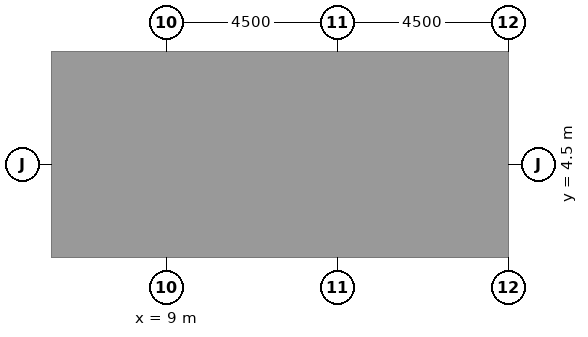
"""IFC4 building model, lengths in metres.
Left out: names, types, materials, properties, quantities, classifications, styles, units other than length and angle.
Written with IfcOpenShell. Run it as: python <this file> out.ifc"""

import sys

from ifc_helpers import new_model, si_unit, direction, frame, frame_2d, origin, place, context, subcontext, project, spatial, rectangle, extrude, element, fill, save


model = new_model("IFC4")
c1 = context("Model", 3, precision=1e-05, world=origin(), true_north=direction((0.0, 1.0)))
c2 = subcontext(c1, "Body", "Model", "MODEL_VIEW")
j1 = project(units=[si_unit("LENGTHUNIT", "METRE"), si_unit("PLANEANGLEUNIT", "RADIAN")], contexts=[c1])
p1 = place(None, origin())
s1 = spatial("IfcSite", under=j1, at=p1, CompositionType="ELEMENT")
p2 = place(p1, origin())
s2 = spatial("IfcBuilding", under=s1, at=p2, CompositionType="ELEMENT")
p3 = place(p2, frame((0.0, 0.0, 7.2)))
s3 = spatial("IfcBuildingStorey", under=s2, at=p3, CompositionType="ELEMENT", Elevation=7.2)
p4 = place(p3, frame((6.5, -9.0, 0.0), z_axis=(0.0, 0.0, 1.0), x_axis=(0.0, 1.0, 0.0)))
e1 = element("IfcWall", 1, at=p4, inside=s3, PredefinedType="SHEAR", context=c2, shape_type="SweptSolid", body=[
    extrude(rectangle(XDim=27.5, YDim=1.0, at=frame_2d((13.75, 0.0))), origin(), (0.0, 0.0, 1.0), 4.1),
])
p5 = place(p4, frame((12.55, 0.0, 0.0)))
e2 = element("IfcOpeningElement", 2, at=p5, cuts=e1, PredefinedType="OPENING", context=c2, shape_type="SweptSolid", body=[
    extrude(rectangle(XDim=2.4, YDim=2.4, at=frame_2d((1.2, 1.2))), frame((0.0, 0.51, 0.0), z_axis=(0.0, -1.0, 0.0), x_axis=(1.0, 0.0, 0.0)), (0.0, 0.0, 1.0), 1.02),
])
p6 = place(p4, frame((4.025, 0.0, 0.0)))
e3 = element("IfcOpeningElement", 3, at=p6, cuts=e1, PredefinedType="OPENING", context=c2, shape_type="SweptSolid", body=[
    extrude(rectangle(XDim=1.2, YDim=2.1, at=frame_2d((0.6, 1.05))), frame((0.0, 0.51, 0.0), z_axis=(0.0, -1.0, 0.0), x_axis=(1.0, 0.0, 0.0)), (0.0, 0.0, 1.0), 1.02),
])
p7 = place(p4, frame((22.275, 0.0, 0.0)))
e4 = element("IfcOpeningElement", 4, at=p7, cuts=e1, PredefinedType="OPENING", context=c2, shape_type="SweptSolid", body=[
    extrude(rectangle(XDim=1.2, YDim=2.1, at=frame_2d((0.6, 1.05))), frame((0.0, 0.51, 0.0), z_axis=(0.0, -1.0, 0.0), x_axis=(1.0, 0.0, 0.0)), (0.0, 0.0, 1.0), 1.02),
])
p8 = place(p3, frame((17.5, -9.0, 0.0), z_axis=(0.0, 0.0, 1.0), x_axis=(0.0, 1.0, 0.0)))
e5 = element("IfcWall", 5, at=p8, inside=s3, PredefinedType="SHEAR", context=c2, shape_type="SweptSolid", body=[
    extrude(rectangle(XDim=27.5, YDim=1.0, at=frame_2d((13.75, 0.0))), origin(), (0.0, 0.0, 1.0), 4.1),
])
p9 = place(p8, frame((12.55, 0.0, 0.0)))
e6 = element("IfcOpeningElement", 6, at=p9, cuts=e5, PredefinedType="OPENING", context=c2, shape_type="SweptSolid", body=[
    extrude(rectangle(XDim=2.4, YDim=2.4, at=frame_2d((1.2, 1.2))), frame((0.0, 0.51, 0.0), z_axis=(0.0, -1.0, 0.0), x_axis=(1.0, 0.0, 0.0)), (0.0, 0.0, 1.0), 1.02),
])
p10 = place(p8, frame((6.825, 0.0, 0.0)))
e7 = element("IfcOpeningElement", 7, at=p10, cuts=e5, PredefinedType="OPENING", context=c2, shape_type="SweptSolid", body=[
    extrude(rectangle(XDim=1.2, YDim=2.1, at=frame_2d((0.6, 1.05))), frame((0.0, 0.51, 0.0), z_axis=(0.0, -1.0, 0.0), x_axis=(1.0, 0.0, 0.0)), (0.0, 0.0, 1.0), 1.02),
])
p11 = place(p8, frame((19.475, 0.0, 0.0)))
e8 = element("IfcOpeningElement", 8, at=p11, cuts=e5, PredefinedType="OPENING", context=c2, shape_type="SweptSolid", body=[
    extrude(rectangle(XDim=1.2, YDim=2.1, at=frame_2d((0.6, 1.05))), frame((0.0, 0.51, 0.0), z_axis=(0.0, -1.0, 0.0), x_axis=(1.0, 0.0, 0.0)), (0.0, 0.0, 1.0), 1.02),
])
p12 = place(p3, frame((7.0, 2.8, 0.0), z_axis=(0.0, 0.0, 1.0), x_axis=(1.0, 0.0, 0.0)))
e9 = element("IfcWall", 9, at=p12, inside=s3, PredefinedType="SHEAR", context=c2, shape_type="SweptSolid", body=[
    extrude(rectangle(XDim=10.0, YDim=0.5, at=frame_2d((5.0, 0.0))), origin(), (0.0, 0.0, 1.0), 4.1),
])
p13 = place(p12, frame((0.512, 0.0, 0.0)))
e10 = element("IfcOpeningElement", 10, at=p13, cuts=e9, PredefinedType="OPENING", context=c2, shape_type="SweptSolid", body=[
    extrude(rectangle(XDim=1.1, YDim=2.1, at=frame_2d((0.55, 1.05))), frame((0.0, 0.26, 0.0), z_axis=(0.0, -1.0, 0.0), x_axis=(1.0, 0.0, 0.0)), (0.0, 0.0, 1.0), 0.52),
])
p14 = place(p12, frame((3.137, 0.0, 0.0)))
e11 = element("IfcOpeningElement", 11, at=p14, cuts=e9, PredefinedType="OPENING", context=c2, shape_type="SweptSolid", body=[
    extrude(rectangle(XDim=1.1, YDim=2.1, at=frame_2d((0.55, 1.05))), frame((0.0, 0.26, 0.0), z_axis=(0.0, -1.0, 0.0), x_axis=(1.0, 0.0, 0.0)), (0.0, 0.0, 1.0), 0.52),
])
p15 = place(p12, frame((8.387, 0.0, 0.0)))
e12 = element("IfcOpeningElement", 12, at=p15, cuts=e9, PredefinedType="OPENING", context=c2, shape_type="SweptSolid", body=[
    extrude(rectangle(XDim=1.1, YDim=2.1, at=frame_2d((0.55, 1.05))), frame((0.0, 0.26, 0.0), z_axis=(0.0, -1.0, 0.0), x_axis=(1.0, 0.0, 0.0)), (0.0, 0.0, 1.0), 0.52),
])
p16 = place(p3, frame((7.0, 6.7, 0.0), z_axis=(0.0, 0.0, 1.0), x_axis=(1.0, 0.0, 0.0)))
e13 = element("IfcWall", 13, at=p16, inside=s3, PredefinedType="SHEAR", context=c2, shape_type="SweptSolid", body=[
    extrude(rectangle(XDim=10.0, YDim=0.5, at=frame_2d((5.0, 0.0))), origin(), (0.0, 0.0, 1.0), 4.1),
])
p17 = place(p16, frame((0.512, 0.0, 0.0)))
e14 = element("IfcOpeningElement", 14, at=p17, cuts=e13, PredefinedType="OPENING", context=c2, shape_type="SweptSolid", body=[
    extrude(rectangle(XDim=1.1, YDim=2.1, at=frame_2d((0.55, 1.05))), frame((0.0, 0.26, 0.0), z_axis=(0.0, -1.0, 0.0), x_axis=(1.0, 0.0, 0.0)), (0.0, 0.0, 1.0), 0.52),
])
p18 = place(p16, frame((3.188, 0.0, 0.0)))
e15 = element("IfcOpeningElement", 15, at=p18, cuts=e13, PredefinedType="OPENING", context=c2, shape_type="SweptSolid", body=[
    extrude(rectangle(XDim=1.0, YDim=2.1, at=frame_2d((0.5, 1.05))), frame((0.0, 0.26, 0.0), z_axis=(0.0, -1.0, 0.0), x_axis=(1.0, 0.0, 0.0)), (0.0, 0.0, 1.0), 0.52),
])
p19 = place(p16, frame((5.812, 0.0, 0.0)))
e16 = element("IfcOpeningElement", 16, at=p19, cuts=e13, PredefinedType="OPENING", context=c2, shape_type="SweptSolid", body=[
    extrude(rectangle(XDim=1.0, YDim=2.1, at=frame_2d((0.5, 1.05))), frame((0.0, 0.26, 0.0), z_axis=(0.0, -1.0, 0.0), x_axis=(1.0, 0.0, 0.0)), (0.0, 0.0, 1.0), 0.52),
])
p20 = place(p16, frame((8.438, 0.0, 0.0)))
e17 = element("IfcOpeningElement", 17, at=p20, cuts=e13, PredefinedType="OPENING", context=c2, shape_type="SweptSolid", body=[
    extrude(rectangle(XDim=1.0, YDim=2.1, at=frame_2d((0.5, 1.05))), frame((0.0, 0.26, 0.0), z_axis=(0.0, -1.0, 0.0), x_axis=(1.0, 0.0, 0.0)), (0.0, 0.0, 1.0), 0.52),
])
for number, where, z_axis, x_axis in (
    (18, (9.375, -0.25, 0.0), (0.0, 0.0, 1.0), (0.0, 1.0, 0.0)),
    (19, (9.375, 6.95, 0.0), (0.0, 0.0, 1.0), (0.0, 1.0, 0.0)),
    (20, (12.0, -0.25, 0.0), (0.0, 0.0, 1.0), (0.0, 1.0, 0.0)),
    (21, (12.0, 6.95, 0.0), (0.0, 0.0, 1.0), (0.0, 1.0, 0.0)),
    (22, (14.625, -0.25, 0.0), (0.0, 0.0, 1.0), (0.0, 1.0, 0.0)),
    (23, (14.625, 6.95, 0.0), (0.0, 0.0, 1.0), (0.0, 1.0, 0.0)),
):
    element("IfcWall", number, at=place(p3, frame(where, z_axis=z_axis, x_axis=x_axis)), inside=s3, PredefinedType="SHEAR", context=c2, shape_type="SweptSolid", body=[
        extrude(rectangle(XDim=2.8, YDim=0.5, at=frame_2d((1.4, 0.0))), origin(), (0.0, 0.0, 1.0), 4.1),
    ])
p21 = place(p13, origin())
e24 = element("IfcDoor", 24, at=p21, inside=s3, OperationType="DOUBLE_DOOR_SLIDING", PredefinedType="DOOR", context=c2, shape_type="SweptSolid", body=[
    extrude(rectangle(XDim=1.1, YDim=2.1, at=frame_2d((0.55, 1.05))), frame((0.0, 0.025, 0.0), z_axis=(0.0, -1.0, 0.0), x_axis=(1.0, 0.0, 0.0)), (0.0, 0.0, 1.0), 0.05),
])
fill(e10, e24)
p22 = place(p14, origin())
e25 = element("IfcDoor", 25, at=p22, inside=s3, OperationType="DOUBLE_DOOR_SLIDING", PredefinedType="DOOR", context=c2, shape_type="SweptSolid", body=[
    extrude(rectangle(XDim=1.1, YDim=2.1, at=frame_2d((0.55, 1.05))), frame((0.0, 0.025, 0.0), z_axis=(0.0, -1.0, 0.0), x_axis=(1.0, 0.0, 0.0)), (0.0, 0.0, 1.0), 0.05),
])
fill(e11, e25)
p23 = place(p15, origin())
e26 = element("IfcDoor", 26, at=p23, inside=s3, OperationType="DOUBLE_DOOR_SLIDING", PredefinedType="DOOR", context=c2, shape_type="SweptSolid", body=[
    extrude(rectangle(XDim=1.1, YDim=2.1, at=frame_2d((0.55, 1.05))), frame((0.0, 0.025, 0.0), z_axis=(0.0, -1.0, 0.0), x_axis=(1.0, 0.0, 0.0)), (0.0, 0.0, 1.0), 0.05),
])
fill(e12, e26)
p24 = place(p17, origin())
e27 = element("IfcDoor", 27, at=p24, inside=s3, OperationType="DOUBLE_DOOR_SLIDING", PredefinedType="DOOR", context=c2, shape_type="SweptSolid", body=[
    extrude(rectangle(XDim=1.1, YDim=2.1, at=frame_2d((0.55, 1.05))), frame((0.0, 0.025, 0.0), z_axis=(0.0, -1.0, 0.0), x_axis=(1.0, 0.0, 0.0)), (0.0, 0.0, 1.0), 0.05),
])
fill(e14, e27)
p25 = place(p5, origin())
e28 = element("IfcDoor", 28, at=p25, inside=s3, OperationType="DOUBLE_DOOR_DOUBLE_SWING", PredefinedType="DOOR", context=c2, shape_type="SweptSolid", body=[
    extrude(rectangle(XDim=2.4, YDim=2.4, at=frame_2d((1.2, 1.2))), frame((0.0, 0.025, 0.0), z_axis=(0.0, -1.0, 0.0), x_axis=(1.0, 0.0, 0.0)), (0.0, 0.0, 1.0), 0.05),
])
fill(e2, e28)
p26 = place(p9, origin())
e29 = element("IfcDoor", 29, at=p26, inside=s3, OperationType="DOUBLE_DOOR_DOUBLE_SWING", PredefinedType="DOOR", context=c2, shape_type="SweptSolid", body=[
    extrude(rectangle(XDim=2.4, YDim=2.4, at=frame_2d((1.2, 1.2))), frame((0.0, 0.025, 0.0), z_axis=(0.0, -1.0, 0.0), x_axis=(1.0, 0.0, 0.0)), (0.0, 0.0, 1.0), 0.05),
])
fill(e6, e29)
p27 = place(p18, origin())
e30 = element("IfcDoor", 30, at=p27, inside=s3, OperationType="SINGLE_SWING_RIGHT", PredefinedType="DOOR", context=c2, shape_type="SweptSolid", body=[
    extrude(rectangle(XDim=1.0, YDim=2.1, at=frame_2d((0.5, 1.05))), frame((0.0, 0.025, 0.0), z_axis=(0.0, -1.0, 0.0), x_axis=(1.0, 0.0, 0.0)), (0.0, 0.0, 1.0), 0.05),
])
fill(e15, e30)
p28 = place(p19, origin())
e31 = element("IfcDoor", 31, at=p28, inside=s3, OperationType="SINGLE_SWING_LEFT", PredefinedType="DOOR", context=c2, shape_type="SweptSolid", body=[
    extrude(rectangle(XDim=1.0, YDim=2.1, at=frame_2d((0.5, 1.05))), frame((0.0, 0.025, 0.0), z_axis=(0.0, -1.0, 0.0), x_axis=(1.0, 0.0, 0.0)), (0.0, 0.0, 1.0), 0.05),
])
fill(e16, e31)
p29 = place(p20, origin())
e32 = element("IfcDoor", 32, at=p29, inside=s3, OperationType="SINGLE_SWING_RIGHT", PredefinedType="DOOR", context=c2, shape_type="SweptSolid", body=[
    extrude(rectangle(XDim=1.0, YDim=2.1, at=frame_2d((0.5, 1.05))), frame((0.0, 0.025, 0.0), z_axis=(0.0, -1.0, 0.0), x_axis=(1.0, 0.0, 0.0)), (0.0, 0.0, 1.0), 0.05),
])
fill(e17, e32)
save(model, sys.argv[1])
